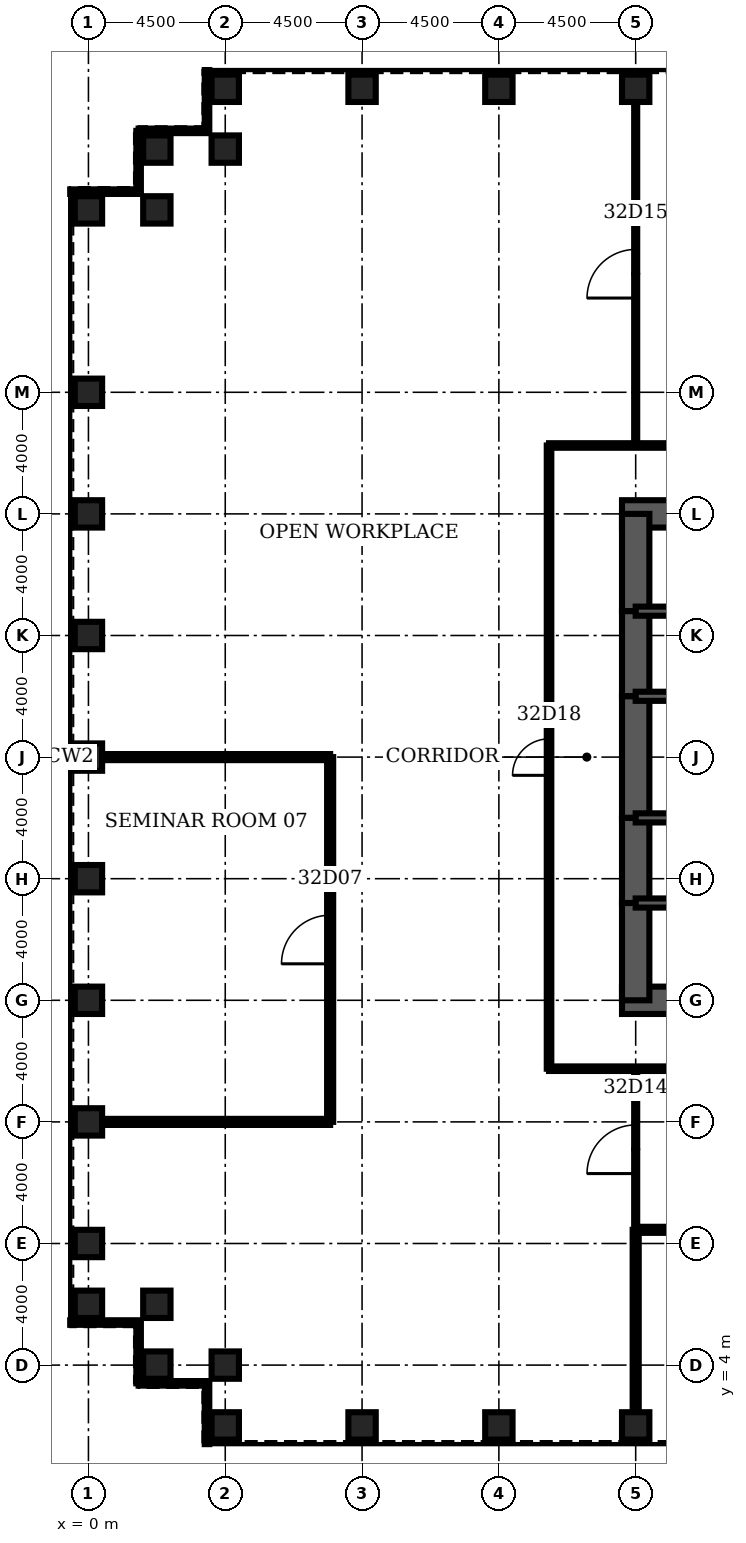
"""IFC4 building model, lengths in metres.
Left out: names, types, materials, properties, quantities, classifications, styles, units other than length and angle.
Written with IfcOpenShell. Run it as: python <this file> out.ifc"""

import sys

from ifc_helpers import new_model, si_unit, direction, frame, frame_2d, origin, origin_2d, place, context, subcontext, project, spatial, rectangle, hollow_rectangle, extrude, element, fill, save


model = new_model("IFC4")
c1 = context("Model", 3, precision=1e-05, world=origin(), true_north=direction((0.0, 1.0)))
c2 = subcontext(c1, "Body", "Model", "MODEL_VIEW")
j1 = project(units=[si_unit("LENGTHUNIT", "METRE"), si_unit("PLANEANGLEUNIT", "RADIAN")], contexts=[c1])
p1 = place(None, origin())
s1 = spatial("IfcSite", under=j1, at=p1, CompositionType="ELEMENT")
p2 = place(p1, origin())
s2 = spatial("IfcBuilding", under=s1, at=p2, CompositionType="ELEMENT")
p3 = place(p2, frame((0.0, 0.0, 146.7)))
s3 = spatial("IfcBuildingStorey", under=s2, at=p3, CompositionType="ELEMENT", Elevation=146.7)
for number, where, z_axis, x_axis in (
    (1, (4.5, 2.0, 0.0), (0.0, 0.0, 1.0), (0.0, 1.0, 0.0)),
    (2, (9.0, 2.0, 0.0), (0.0, 0.0, 1.0), (0.0, 1.0, 0.0)),
    (3, (13.5, 2.0, 0.0), (0.0, 0.0, 1.0), (0.0, 1.0, 0.0)),
    (4, (18.0, 2.0, 0.0), (0.0, 0.0, 1.0), (0.0, 1.0, 0.0)),
    (5, (18.0, 46.0, 0.0), (0.0, 0.0, 1.0), (0.0, 1.0, 0.0)),
    (6, (13.5, 46.0, 0.0), (0.0, 0.0, 1.0), (0.0, 1.0, 0.0)),
    (7, (9.0, 46.0, 0.0), (0.0, 0.0, 1.0), (0.0, 1.0, 0.0)),
    (8, (4.5, 46.0, 0.0), (0.0, 0.0, 1.0), (0.0, 1.0, 0.0)),
    (9, (4.5, 44.0, 0.0), (0.0, 0.0, 1.0), (0.0, 1.0, 0.0)),
    (10, (2.25, 44.0, 0.0), (0.0, 0.0, 1.0), (1.0, 0.0, 0.0)),
    (11, (2.25, 42.0, 0.0), (0.0, 0.0, 1.0), (1.0, 0.0, 0.0)),
    (12, (0.0, 42.0, 0.0), (0.0, 0.0, 1.0), (1.0, 0.0, 0.0)),
    (13, (0.0, 36.0, 0.0), (0.0, 0.0, 1.0), (1.0, 0.0, 0.0)),
    (14, (0.0, 32.0, 0.0), (0.0, 0.0, 1.0), (1.0, 0.0, 0.0)),
    (15, (0.0, 28.0, 0.0), (0.0, 0.0, 1.0), (1.0, 0.0, 0.0)),
    (16, (0.0, 24.0, 0.0), (0.0, 0.0, 1.0), (1.0, 0.0, 0.0)),
    (17, (0.0, 20.0, 0.0), (0.0, 0.0, 1.0), (1.0, 0.0, 0.0)),
    (18, (0.0, 16.0, 0.0), (0.0, 0.0, 1.0), (1.0, 0.0, 0.0)),
    (19, (0.0, 12.0, 0.0), (0.0, 0.0, 1.0), (1.0, 0.0, 0.0)),
    (20, (0.0, 8.0, 0.0), (0.0, 0.0, 1.0), (1.0, 0.0, 0.0)),
    (21, (0.0, 6.0, 0.0), (0.0, 0.0, 1.0), (1.0, 0.0, 0.0)),
    (22, (2.25, 6.0, 0.0), (0.0, 0.0, 1.0), (1.0, 0.0, 0.0)),
    (23, (2.25, 4.0, 0.0), (0.0, 0.0, 1.0), (1.0, 0.0, 0.0)),
    (24, (4.5, 4.0, 0.0), (0.0, 0.0, 1.0), (0.0, 1.0, 0.0)),
):
    element("IfcColumn", number, at=place(p3, frame(where, z_axis=z_axis, x_axis=x_axis)), inside=s3, PredefinedType="COLUMN", context=c2, shape_type="SweptSolid", body=[
        extrude(hollow_rectangle(XDim=0.9, YDim=0.9, WallThickness=0.1, at=origin_2d()), origin(), (0.0, 0.0, 1.0), 4.2),
    ])
for number, where, z_axis, x_axis in (
    (25, (17.55, 16.0, 0.0), (0.0, 0.0, 1.0), (1.0, 0.0, 0.0)),
    (26, (27.0, 32.0, 0.0), (0.0, 0.0, 1.0), (-1.0, 0.0, 0.0)),
):
    element("IfcWall", number, at=place(p3, frame(where, z_axis=z_axis, x_axis=x_axis)), inside=s3, PredefinedType="SHEAR", context=c2, shape_type="SweptSolid", body=[
        extrude(rectangle(XDim=9.45, YDim=0.9, at=frame_2d((4.725, 0.0))), origin(), (0.0, 0.0, 1.0), 4.2),
    ])
p4 = place(p3, frame((18.0, 32.0, 0.0), z_axis=(0.0, 0.0, 1.0), x_axis=(0.0, -1.0, 0.0)))
e27 = element("IfcWall", 27, at=p4, inside=s3, PredefinedType="SHEAR", context=c2, shape_type="SweptSolid", body=[
    extrude(rectangle(XDim=3.2, YDim=0.9, at=frame_2d((1.6, 0.0))), origin(), (0.0, 0.0, 1.0), 4.2),
])
p5 = place(p3, frame((18.0, 28.8, 0.0), z_axis=(0.0, 0.0, 1.0), x_axis=(0.0, -1.0, 0.0)))
e28 = element("IfcWall", 28, at=p5, inside=s3, PredefinedType="SHEAR", context=c2, shape_type="SweptSolid", body=[
    extrude(rectangle(XDim=2.8, YDim=0.9, at=frame_2d((1.4, 0.0))), origin(), (0.0, 0.0, 1.0), 4.2),
])
p6 = place(p5, frame((0.4, 0.0, 0.0)))
e29 = element("IfcOpeningElement", 29, at=p6, cuts=e28, PredefinedType="OPENING", context=c2, shape_type="SweptSolid", body=[
    extrude(rectangle(XDim=1.8, YDim=2.1, at=frame_2d((0.9, 1.05))), frame((0.0, 0.46, 0.0), z_axis=(0.0, -1.0, 0.0), x_axis=(1.0, 0.0, 0.0)), (0.0, 0.0, 1.0), 0.92),
])
p7 = place(p3, frame((18.0, 26.0, 0.0), z_axis=(0.0, 0.0, 1.0), x_axis=(0.0, -1.0, 0.0)))
e30 = element("IfcWall", 30, at=p7, inside=s3, PredefinedType="SHEAR", context=c2, shape_type="SweptSolid", body=[
    extrude(rectangle(XDim=4.0, YDim=0.9, at=frame_2d((2.0, 0.0))), origin(), (0.0, 0.0, 1.0), 4.2),
])
p8 = place(p3, frame((18.0, 22.0, 0.0), z_axis=(0.0, 0.0, 1.0), x_axis=(0.0, -1.0, 0.0)))
e31 = element("IfcWall", 31, at=p8, inside=s3, PredefinedType="SHEAR", context=c2, shape_type="SweptSolid", body=[
    extrude(rectangle(XDim=2.8, YDim=0.9, at=frame_2d((1.4, 0.0))), origin(), (0.0, 0.0, 1.0), 4.2),
])
p9 = place(p8, frame((0.6, 0.0, 0.0)))
e32 = element("IfcOpeningElement", 32, at=p9, cuts=e31, PredefinedType="OPENING", context=c2, shape_type="SweptSolid", body=[
    extrude(rectangle(XDim=1.8, YDim=2.1, at=frame_2d((0.9, 1.05))), frame((0.0, 0.46, 0.0), z_axis=(0.0, -1.0, 0.0), x_axis=(1.0, 0.0, 0.0)), (0.0, 0.0, 1.0), 0.92),
])
p10 = place(p3, frame((18.0, 19.2, 0.0), z_axis=(0.0, 0.0, 1.0), x_axis=(0.0, -1.0, 0.0)))
e33 = element("IfcWall", 33, at=p10, inside=s3, PredefinedType="SHEAR", context=c2, shape_type="SweptSolid", body=[
    extrude(rectangle(XDim=3.2, YDim=0.9, at=frame_2d((1.6, 0.0))), origin(), (0.0, 0.0, 1.0), 4.2),
])
p11 = place(p3, frame((18.0, 19.2, 0.0), z_axis=(0.0, 0.0, 1.0), x_axis=(1.0, 0.0, 0.0)))
e34 = element("IfcWall", 34, at=p11, inside=s3, PredefinedType="SOLIDWALL", context=c2, shape_type="SweptSolid", body=[
    extrude(rectangle(XDim=9.0, YDim=0.3, at=frame_2d((4.5, 0.0))), origin(), (0.0, 0.0, 1.0), 4.2),
])
p12 = place(p11, frame((0.65, 0.0, 0.0)))
e35 = element("IfcOpeningElement", 35, at=p12, cuts=e34, PredefinedType="OPENING", context=c2, shape_type="SweptSolid", body=[
    extrude(rectangle(XDim=1.0, YDim=2.1, at=frame_2d((0.5, 1.05))), frame((0.0, 0.16, 0.0), z_axis=(0.0, -1.0, 0.0), x_axis=(1.0, 0.0, 0.0)), (0.0, 0.0, 1.0), 0.32),
])
p13 = place(p3, frame((18.0, 28.8, 0.0), z_axis=(0.0, 0.0, 1.0), x_axis=(1.0, 0.0, 0.0)))
e36 = element("IfcWall", 36, at=p13, inside=s3, PredefinedType="SOLIDWALL", context=c2, shape_type="SweptSolid", body=[
    extrude(rectangle(XDim=9.0, YDim=0.3, at=frame_2d((4.5, 0.0))), origin(), (0.0, 0.0, 1.0), 4.2),
])
p14 = place(p13, frame((0.65, 0.0, 0.0)))
e37 = element("IfcOpeningElement", 37, at=p14, cuts=e36, PredefinedType="OPENING", context=c2, shape_type="SweptSolid", body=[
    extrude(rectangle(XDim=1.0, YDim=2.1, at=frame_2d((0.5, 1.05))), frame((0.0, 0.16, 0.0), z_axis=(0.0, -1.0, 0.0), x_axis=(1.0, 0.0, 0.0)), (0.0, 0.0, 1.0), 0.32),
])
p15 = place(p3, frame((18.0, 22.0, 0.0), z_axis=(0.0, 0.0, 1.0), x_axis=(1.0, 0.0, 0.0)))
e38 = element("IfcWall", 38, at=p15, inside=s3, PredefinedType="SOLIDWALL", context=c2, shape_type="SweptSolid", body=[
    extrude(rectangle(XDim=6.0, YDim=0.3, at=frame_2d((3.0, 0.0))), origin(), (0.0, 0.0, 1.0), 4.2),
])
p16 = place(p15, frame((4.4, 0.0, 0.0)))
e39 = element("IfcOpeningElement", 39, at=p16, cuts=e38, PredefinedType="OPENING", context=c2, shape_type="SweptSolid", body=[
    extrude(rectangle(XDim=1.0, YDim=2.1, at=frame_2d((0.5, 1.05))), frame((0.0, 0.16, 0.0), z_axis=(0.0, -1.0, 0.0), x_axis=(1.0, 0.0, 0.0)), (0.0, 0.0, 1.0), 0.32),
])
p17 = place(p15, frame((0.7, 0.0, 0.0)))
e40 = element("IfcOpeningElement", 40, at=p17, cuts=e38, PredefinedType="OPENING", context=c2, shape_type="SweptSolid", body=[
    extrude(rectangle(XDim=1.0, YDim=2.1, at=frame_2d((0.5, 1.05))), frame((0.0, 0.16, 0.0), z_axis=(0.0, -1.0, 0.0), x_axis=(1.0, 0.0, 0.0)), (0.0, 0.0, 1.0), 0.32),
])
p18 = place(p3, frame((18.0, 26.0, 0.0), z_axis=(0.0, 0.0, 1.0), x_axis=(1.0, 0.0, 0.0)))
e41 = element("IfcWall", 41, at=p18, inside=s3, PredefinedType="SOLIDWALL", context=c2, shape_type="SweptSolid", body=[
    extrude(rectangle(XDim=6.0, YDim=0.3, at=frame_2d((3.0, 0.0))), origin(), (0.0, 0.0, 1.0), 4.2),
])
p19 = place(p3, frame((18.0, 8.45, 0.0), z_axis=(0.0, 0.0, 1.0), x_axis=(1.0, 0.0, 0.0)))
e42 = element("IfcWall", 42, at=p19, inside=s3, PredefinedType="PARTITIONING", context=c2, shape_type="SweptSolid", body=[
    extrude(rectangle(XDim=36.0, YDim=0.2, at=frame_2d((18.0, 0.0))), origin(), (0.0, 0.0, 1.0), 3.0),
])
p20 = place(p19, frame((3.7, 0.0, 0.0)))
e43 = element("IfcOpeningElement", 43, at=p20, cuts=e42, PredefinedType="OPENING", context=c2, shape_type="SweptSolid", body=[
    extrude(rectangle(XDim=1.6, YDim=2.1, at=frame_2d((0.8, 1.05))), frame((0.0, 0.11, 0.0), z_axis=(0.0, -1.0, 0.0), x_axis=(1.0, 0.0, 0.0)), (0.0, 0.0, 1.0), 0.22),
])
p21 = place(p19, frame((12.7, 0.0, 0.0)))
e44 = element("IfcOpeningElement", 44, at=p21, cuts=e42, PredefinedType="OPENING", context=c2, shape_type="SweptSolid", body=[
    extrude(rectangle(XDim=1.6, YDim=2.1, at=frame_2d((0.8, 1.05))), frame((0.0, 0.11, 0.0), z_axis=(0.0, -1.0, 0.0), x_axis=(1.0, 0.0, 0.0)), (0.0, 0.0, 1.0), 0.22),
])
p22 = place(p19, frame((21.7, 0.0, 0.0)))
e45 = element("IfcOpeningElement", 45, at=p22, cuts=e42, PredefinedType="OPENING", context=c2, shape_type="SweptSolid", body=[
    extrude(rectangle(XDim=1.6, YDim=2.1, at=frame_2d((0.8, 1.05))), frame((0.0, 0.11, 0.0), z_axis=(0.0, -1.0, 0.0), x_axis=(1.0, 0.0, 0.0)), (0.0, 0.0, 1.0), 0.22),
])
p23 = place(p19, frame((30.7, 0.0, 0.0)))
e46 = element("IfcOpeningElement", 46, at=p23, cuts=e42, PredefinedType="OPENING", context=c2, shape_type="SweptSolid", body=[
    extrude(rectangle(XDim=1.6, YDim=2.1, at=frame_2d((0.8, 1.05))), frame((0.0, 0.11, 0.0), z_axis=(0.0, -1.0, 0.0), x_axis=(1.0, 0.0, 0.0)), (0.0, 0.0, 1.0), 0.22),
])
p24 = place(p3, frame((0.45, 12.0, 0.0), z_axis=(0.0, 0.0, 1.0), x_axis=(1.0, 0.0, 0.0)))
e47 = element("IfcWall", 47, at=p24, inside=s3, PredefinedType="PARTITIONING", context=c2, shape_type="SweptSolid", body=[
    extrude(rectangle(XDim=7.5, YDim=0.2, at=frame_2d((3.75, 0.0))), origin(), (0.0, 0.0, 1.0), 3.0),
])
p25 = place(p3, frame((15.15, 13.75, 0.0), z_axis=(0.0, 0.0, 1.0), x_axis=(1.0, 0.0, 0.0)))
e48 = element("IfcWall", 48, at=p25, inside=s3, PredefinedType="PARTITIONING", context=c2, shape_type="SweptSolid", body=[
    extrude(rectangle(XDim=41.7, YDim=0.15, at=frame_2d((20.85, 0.0))), origin(), (0.0, 0.0, 1.0), 3.0),
])
p26 = place(p25, frame((18.75, 0.0, 0.0)))
e49 = element("IfcOpeningElement", 49, at=p26, cuts=e48, PredefinedType="OPENING", context=c2, shape_type="SweptSolid", body=[
    extrude(rectangle(XDim=1.2, YDim=2.1, at=frame_2d((0.6, 1.05))), frame((0.0, 0.085, 0.0), z_axis=(0.0, -1.0, 0.0), x_axis=(1.0, 0.0, 0.0)), (0.0, 0.0, 1.0), 0.17),
])
p27 = place(p3, frame((0.45, 24.0, 0.0), z_axis=(0.0, 0.0, 1.0), x_axis=(1.0, 0.0, 0.0)))
e50 = element("IfcWall", 50, at=p27, inside=s3, PredefinedType="PARTITIONING", context=c2, shape_type="SweptSolid", body=[
    extrude(rectangle(XDim=7.5, YDim=0.2, at=frame_2d((3.75, 0.0))), origin(), (0.0, 0.0, 1.0), 3.0),
])
p28 = place(p3, frame((15.15, 34.25, 0.0), z_axis=(0.0, 0.0, 1.0), x_axis=(1.0, 0.0, 0.0)))
e51 = element("IfcWall", 51, at=p28, inside=s3, PredefinedType="PARTITIONING", context=c2, shape_type="SweptSolid", body=[
    extrude(rectangle(XDim=41.7, YDim=0.15, at=frame_2d((20.85, 0.0))), origin(), (0.0, 0.0, 1.0), 3.0),
])
p29 = place(p28, frame((20.25, 0.0, 0.0)))
e52 = element("IfcOpeningElement", 52, at=p29, cuts=e51, PredefinedType="OPENING", context=c2, shape_type="SweptSolid", body=[
    extrude(rectangle(XDim=1.2, YDim=2.1, at=frame_2d((0.6, 1.05))), frame((0.0, 0.085, 0.0), z_axis=(0.0, -1.0, 0.0), x_axis=(1.0, 0.0, 0.0)), (0.0, 0.0, 1.0), 0.17),
])
p30 = place(p3, frame((7.95, 12.0, 0.0), z_axis=(0.0, 0.0, 1.0), x_axis=(0.0, 1.0, 0.0)))
e53 = element("IfcWall", 53, at=p30, inside=s3, PredefinedType="PARTITIONING", context=c2, shape_type="SweptSolid", body=[
    extrude(rectangle(XDim=12.0, YDim=0.2, at=frame_2d((6.0, 0.0))), origin(), (0.0, 0.0, 1.0), 3.0),
])
p31 = place(p30, frame((5.2, 0.0, 0.0)))
e54 = element("IfcOpeningElement", 54, at=p31, cuts=e53, PredefinedType="OPENING", context=c2, shape_type="SweptSolid", body=[
    extrude(rectangle(XDim=1.6, YDim=2.1, at=frame_2d((0.8, 1.05))), frame((0.0, 0.11, 0.0), z_axis=(0.0, -1.0, 0.0), x_axis=(1.0, 0.0, 0.0)), (0.0, 0.0, 1.0), 0.22),
])
p32 = place(p3, frame((15.15, 13.75, 0.0), z_axis=(0.0, 0.0, 1.0), x_axis=(0.0, 1.0, 0.0)))
e55 = element("IfcWall", 55, at=p32, inside=s3, PredefinedType="PARTITIONING", context=c2, shape_type="SweptSolid", body=[
    extrude(rectangle(XDim=20.5, YDim=0.15, at=frame_2d((10.25, 0.0))), origin(), (0.0, 0.0, 1.0), 3.0),
])
p33 = place(p32, frame((9.65, 0.0, 0.0)))
e56 = element("IfcOpeningElement", 56, at=p33, cuts=e55, PredefinedType="OPENING", context=c2, shape_type="SweptSolid", body=[
    extrude(rectangle(XDim=1.2, YDim=2.1, at=frame_2d((0.6, 1.05))), frame((0.0, 0.085, 0.0), z_axis=(0.0, -1.0, 0.0), x_axis=(1.0, 0.0, 0.0)), (0.0, 0.0, 1.0), 0.17),
])
p34 = place(p3, frame((18.0, 2.45, 0.0), z_axis=(0.0, 0.0, 1.0), x_axis=(0.0, 1.0, 0.0)))
e57 = element("IfcWall", 57, at=p34, inside=s3, PredefinedType="PARTITIONING", context=c2, shape_type="SweptSolid", body=[
    extrude(rectangle(XDim=6.0, YDim=0.2, at=frame_2d((3.0, 0.0))), origin(), (0.0, 0.0, 1.0), 3.0),
])
p35 = place(p3, frame((18.0, 8.45, 0.0), z_axis=(0.0, 0.0, 1.0), x_axis=(0.0, 1.0, 0.0)))
e58 = element("IfcWall", 58, at=p35, inside=s3, PredefinedType="PARTITIONING", context=c2, shape_type="SweptSolid", body=[
    extrude(rectangle(XDim=5.3, YDim=0.1, at=frame_2d((2.65, 0.0))), origin(), (0.0, 0.0, 1.0), 3.0),
])
p36 = place(p35, frame((1.85, 0.0, 0.0)))
e59 = element("IfcOpeningElement", 59, at=p36, cuts=e58, PredefinedType="OPENING", context=c2, shape_type="SweptSolid", body=[
    extrude(rectangle(XDim=1.6, YDim=2.1, at=frame_2d((0.8, 1.05))), frame((0.0, 0.06, 0.0), z_axis=(0.0, -1.0, 0.0), x_axis=(1.0, 0.0, 0.0)), (0.0, 0.0, 1.0), 0.12),
])
p37 = place(p3, frame((18.0, 34.25, 0.0), z_axis=(0.0, 0.0, 1.0), x_axis=(0.0, 1.0, 0.0)))
e60 = element("IfcWall", 60, at=p37, inside=s3, PredefinedType="PARTITIONING", context=c2, shape_type="SweptSolid", body=[
    extrude(rectangle(XDim=11.3, YDim=0.1, at=frame_2d((5.65, 0.0))), origin(), (0.0, 0.0, 1.0), 3.0),
])
p38 = place(p37, frame((4.85, 0.0, 0.0)))
e61 = element("IfcOpeningElement", 61, at=p38, cuts=e60, PredefinedType="OPENING", context=c2, shape_type="SweptSolid", body=[
    extrude(rectangle(XDim=1.6, YDim=2.1, at=frame_2d((0.8, 1.05))), frame((0.0, 0.06, 0.0), z_axis=(0.0, -1.0, 0.0), x_axis=(1.0, 0.0, 0.0)), (0.0, 0.0, 1.0), 0.12),
])
p39 = place(p3, frame((3.9, 46.6, 0.0), z_axis=(0.0, 0.0, 1.0), x_axis=(0.0, -1.0, 0.0)))
e62 = element("IfcWall", 62, at=p39, inside=s3, PredefinedType="ELEMENTEDWALL", context=c2, shape_type="SweptSolid", body=[
    extrude(rectangle(XDim=2.0, YDim=0.15, at=frame_2d((1.0, 0.0))), origin(), (0.0, 0.0, 1.0), 4.04),
])
p40 = place(p3, frame((3.9, 44.6, 0.0), z_axis=(0.0, 0.0, 1.0), x_axis=(-1.0, 0.0, 0.0)))
e63 = element("IfcWall", 63, at=p40, inside=s3, PredefinedType="ELEMENTEDWALL", context=c2, shape_type="SweptSolid", body=[
    extrude(rectangle(XDim=2.25, YDim=0.15, at=frame_2d((1.125, 0.0))), origin(), (0.0, 0.0, 1.0), 4.04),
])
p41 = place(p3, frame((1.65, 44.6, 0.0), z_axis=(0.0, 0.0, 1.0), x_axis=(0.0, -1.0, 0.0)))
e64 = element("IfcWall", 64, at=p41, inside=s3, PredefinedType="ELEMENTEDWALL", context=c2, shape_type="SweptSolid", body=[
    extrude(rectangle(XDim=2.0, YDim=0.15, at=frame_2d((1.0, 0.0))), origin(), (0.0, 0.0, 1.0), 4.04),
])
for number, where, z_axis, x_axis in (
    (65, (1.65, 42.6, 0.0), (0.0, 0.0, 1.0), (-1.0, 0.0, 0.0)),
    (66, (-0.6, 5.4, 0.0), (0.0, 0.0, 1.0), (1.0, 0.0, 0.0)),
):
    element("IfcWall", number, at=place(p3, frame(where, z_axis=z_axis, x_axis=x_axis)), inside=s3, PredefinedType="ELEMENTEDWALL", context=c2, shape_type="SweptSolid", body=[
        extrude(rectangle(XDim=2.25, YDim=0.15, at=frame_2d((1.125, 0.0))), origin(), (0.0, 0.0, 1.0), 4.04),
    ])
p42 = place(p3, frame((1.65, 5.4, 0.0), z_axis=(0.0, 0.0, 1.0), x_axis=(0.0, -1.0, 0.0)))
e67 = element("IfcWall", 67, at=p42, inside=s3, PredefinedType="ELEMENTEDWALL", context=c2, shape_type="SweptSolid", body=[
    extrude(rectangle(XDim=2.0, YDim=0.15, at=frame_2d((1.0, 0.0))), origin(), (0.0, 0.0, 1.0), 4.04),
])
p43 = place(p3, frame((1.65, 3.4, 0.0), z_axis=(0.0, 0.0, 1.0), x_axis=(1.0, 0.0, 0.0)))
e68 = element("IfcWall", 68, at=p43, inside=s3, PredefinedType="ELEMENTEDWALL", context=c2, shape_type="SweptSolid", body=[
    extrude(rectangle(XDim=2.25, YDim=0.15, at=frame_2d((1.125, 0.0))), origin(), (0.0, 0.0, 1.0), 4.04),
])
p44 = place(p3, frame((3.9, 3.4, 0.0), z_axis=(0.0, 0.0, 1.0), x_axis=(0.0, -1.0, 0.0)))
e69 = element("IfcWall", 69, at=p44, inside=s3, PredefinedType="ELEMENTEDWALL", context=c2, shape_type="SweptSolid", body=[
    extrude(rectangle(XDim=2.0, YDim=0.15, at=frame_2d((1.0, 0.0))), origin(), (0.0, 0.0, 1.0), 4.04),
])
p45 = place(p31, origin())
e70 = element("IfcDoor", 70, at=p45, inside=s3, OperationType="SINGLE_SWING_LEFT", PredefinedType="DOOR", context=c2, shape_type="SweptSolid", body=[
    extrude(rectangle(XDim=1.6, YDim=2.1, at=frame_2d((0.8, 1.05))), frame((0.0, 0.025, 0.0), z_axis=(0.0, -1.0, 0.0), x_axis=(1.0, 0.0, 0.0)), (0.0, 0.0, 1.0), 0.05),
])
fill(e54, e70)
p46 = place(p36, origin())
e71 = element("IfcDoor", 71, at=p46, inside=s3, OperationType="SINGLE_SWING_LEFT", PredefinedType="DOOR", context=c2, shape_type="SweptSolid", body=[
    extrude(rectangle(XDim=1.6, YDim=2.1, at=frame_2d((0.8, 1.05))), frame((0.0, 0.025, 0.0), z_axis=(0.0, -1.0, 0.0), x_axis=(1.0, 0.0, 0.0)), (0.0, 0.0, 1.0), 0.05),
])
fill(e59, e71)
p47 = place(p38, origin())
e72 = element("IfcDoor", 72, at=p47, inside=s3, OperationType="SINGLE_SWING_LEFT", PredefinedType="DOOR", context=c2, shape_type="SweptSolid", body=[
    extrude(rectangle(XDim=1.6, YDim=2.1, at=frame_2d((0.8, 1.05))), frame((0.0, 0.025, 0.0), z_axis=(0.0, -1.0, 0.0), x_axis=(1.0, 0.0, 0.0)), (0.0, 0.0, 1.0), 0.05),
])
fill(e61, e72)
p48 = place(p33, origin())
e73 = element("IfcDoor", 73, at=p48, inside=s3, OperationType="SINGLE_SWING_LEFT", PredefinedType="DOOR", context=c2, shape_type="SweptSolid", body=[
    extrude(rectangle(XDim=1.2, YDim=2.1, at=frame_2d((0.6, 1.05))), frame((0.0, 0.025, 0.0), z_axis=(0.0, -1.0, 0.0), x_axis=(1.0, 0.0, 0.0)), (0.0, 0.0, 1.0), 0.05),
])
fill(e56, e73)
p49 = place(p12, origin())
e74 = element("IfcDoor", 74, at=p49, inside=s3, OperationType="SINGLE_SWING_LEFT", PredefinedType="DOOR", context=c2, shape_type="SweptSolid", body=[
    extrude(rectangle(XDim=1.0, YDim=2.1, at=frame_2d((0.5, 1.05))), frame((0.0, 0.025, 0.0), z_axis=(0.0, -1.0, 0.0), x_axis=(1.0, 0.0, 0.0)), (0.0, 0.0, 1.0), 0.05),
])
fill(e35, e74)
p50 = place(p14, origin())
e75 = element("IfcDoor", 75, at=p50, inside=s3, OperationType="SINGLE_SWING_LEFT", PredefinedType="DOOR", context=c2, shape_type="SweptSolid", body=[
    extrude(rectangle(XDim=1.0, YDim=2.1, at=frame_2d((0.5, 1.05))), frame((0.0, 0.025, 0.0), z_axis=(0.0, -1.0, 0.0), x_axis=(1.0, 0.0, 0.0)), (0.0, 0.0, 1.0), 0.05),
])
fill(e37, e75)
p51 = place(p9, origin())
e76 = element("IfcDoor", 76, at=p51, inside=s3, OperationType="SINGLE_SWING_LEFT", PredefinedType="DOOR", context=c2, shape_type="SweptSolid", body=[
    extrude(rectangle(XDim=1.8, YDim=2.1, at=frame_2d((0.9, 1.05))), frame((0.0, 0.45, 0.0), z_axis=(0.0, -1.0, 0.0), x_axis=(1.0, 0.0, 0.0)), (0.0, 0.0, 1.0), 0.899),
])
fill(e32, e76)
p52 = place(p6, origin())
e77 = element("IfcDoor", 77, at=p52, inside=s3, OperationType="SINGLE_SWING_LEFT", PredefinedType="DOOR", context=c2, shape_type="SweptSolid", body=[
    extrude(rectangle(XDim=1.8, YDim=2.1, at=frame_2d((0.9, 1.05))), frame((0.0, 0.45, 0.0), z_axis=(0.0, -1.0, 0.0), x_axis=(1.0, 0.0, 0.0)), (0.0, 0.0, 1.0), 0.899),
])
fill(e29, e77)
p53 = place(p17, origin())
e78 = element("IfcDoor", 78, at=p53, inside=s3, OperationType="SINGLE_SWING_LEFT", PredefinedType="DOOR", context=c2, shape_type="SweptSolid", body=[
    extrude(rectangle(XDim=1.0, YDim=2.1, at=frame_2d((0.5, 1.05))), frame((0.0, 0.025, 0.0), z_axis=(0.0, -1.0, 0.0), x_axis=(1.0, 0.0, 0.0)), (0.0, 0.0, 1.0), 0.05),
])
fill(e40, e78)
save(model, sys.argv[1])
